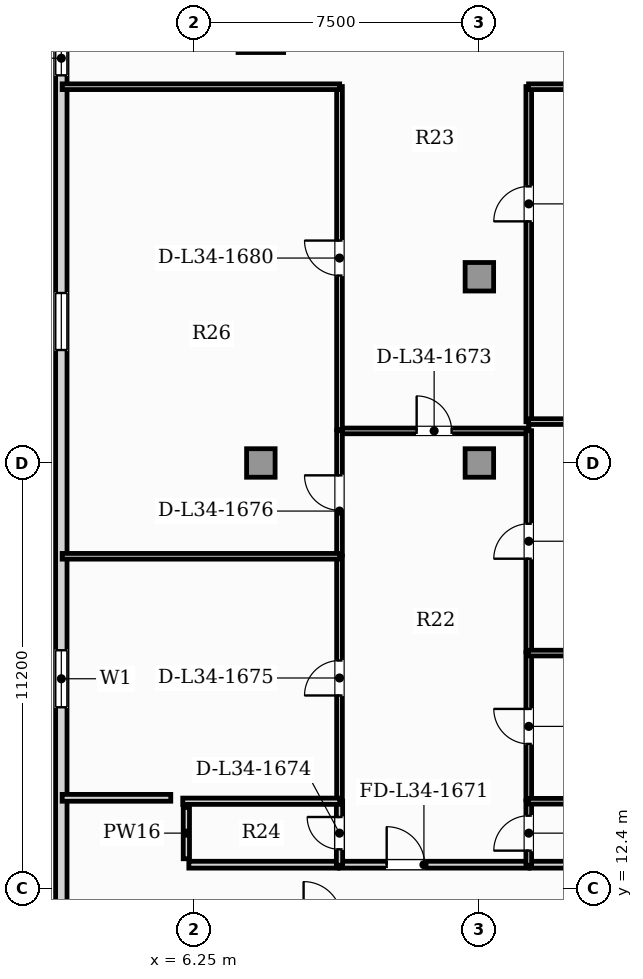
"""IFC4 building model, lengths in metres.
Left out: names, types, materials, properties, quantities, classifications, styles, units other than length and angle.
Written with IfcOpenShell. Run it as: python <this file> out.ifc"""

import sys

from ifc_helpers import new_model, si_unit, direction, frame, frame_2d, origin, origin_2d, place, context, subcontext, project, spatial, rectangle, hollow_rectangle, extrude, element, fill, save


model = new_model("IFC4")
c1 = context("Model", 3, precision=1e-05, world=origin(), true_north=direction((0.0, 1.0)))
c2 = subcontext(c1, "Body", "Model", "MODEL_VIEW")
j1 = project(units=[si_unit("LENGTHUNIT", "METRE"), si_unit("PLANEANGLEUNIT", "RADIAN")], contexts=[c1])
p1 = place(None, origin())
s1 = spatial("IfcSite", under=j1, at=p1, CompositionType="ELEMENT")
p2 = place(p1, origin())
s2 = spatial("IfcBuilding", under=s1, at=p2, CompositionType="ELEMENT")
p3 = place(p2, frame((0.0, 0.0, 140.15)))
s3 = spatial("IfcBuildingStorey", under=s2, at=p3, CompositionType="ELEMENT", Elevation=140.15)
p4 = place(p3, frame((8.0, 35.0, 0.0), z_axis=(0.0, 0.0, 1.0), x_axis=(1.0, 0.0, 0.0)))
e1 = element("IfcColumn", 1, at=p4, inside=s3, PredefinedType="USERDEFINED", context=c2, shape_type="SweptSolid", body=[
    extrude(hollow_rectangle(XDim=1.2, YDim=1.2, WallThickness=0.07, at=origin_2d()), origin(), (0.0, 0.0, 1.0), 5.05),
])
for number, where, z_axis, x_axis in (
    (2, (8.0, 23.6, 0.0), (0.0, 0.0, 1.0), (1.0, 0.0, 0.0)),
    (3, (13.75, 23.6, 0.0), (0.0, 0.0, 1.0), (1.0, 0.0, 0.0)),
    (4, (13.75, 28.5, 0.0), (0.0, 0.0, 1.0), (1.0, 0.0, 0.0)),
):
    element("IfcColumn", number, at=place(p3, frame(where, z_axis=z_axis, x_axis=x_axis)), inside=s3, PredefinedType="COLUMN", context=c2, shape_type="SweptSolid", body=[
        extrude(rectangle(XDim=0.75, YDim=0.75, at=origin_2d()), origin(), (0.0, 0.0, 1.0), 5.05),
    ])
p5 = place(p3, frame((2.75, 39.96, 0.0), z_axis=(0.0, 0.0, 1.0), x_axis=(0.0, -1.0, 0.0)))
e5 = element("IfcWall", 5, at=p5, inside=s3, PredefinedType="SOLIDWALL", context=c2, shape_type="SweptSolid", body=[
    extrude(rectangle(XDim=36.72, YDim=0.3, at=frame_2d((18.36, 0.0))), origin(), (0.0, 0.0, 1.0), 4.83),
])
p6 = place(p5, frame((5.26, 0.0, 0.95)))
e6 = element("IfcOpeningElement", 6, at=p6, cuts=e5, PredefinedType="OPENING", context=c2, shape_type="SweptSolid", body=[
    extrude(rectangle(XDim=0.9, YDim=1.5, at=frame_2d((0.45, 0.75))), frame((0.0, 0.16, 0.0), z_axis=(0.0, -1.0, 0.0), x_axis=(1.0, 0.0, 0.0)), (0.0, 0.0, 1.0), 0.32),
])
p7 = place(p5, frame((21.287, 0.0, 0.9)))
e7 = element("IfcOpeningElement", 7, at=p7, cuts=e5, PredefinedType="OPENING", context=c2, shape_type="SweptSolid", body=[
    extrude(rectangle(XDim=1.5, YDim=1.95, at=frame_2d((0.75, 0.975))), frame((0.0, 0.16, 0.0), z_axis=(0.0, -1.0, 0.0), x_axis=(1.0, 0.0, 0.0)), (0.0, 0.0, 1.0), 0.32),
])
p8 = place(p5, frame((11.887, 0.0, 0.9)))
e8 = element("IfcOpeningElement", 8, at=p8, cuts=e5, PredefinedType="OPENING", context=c2, shape_type="SweptSolid", body=[
    extrude(rectangle(XDim=1.5, YDim=1.95, at=frame_2d((0.75, 0.975))), frame((0.0, 0.16, 0.0), z_axis=(0.0, -1.0, 0.0), x_axis=(1.0, 0.0, 0.0)), (0.0, 0.0, 1.0), 0.32),
])
p9 = place(p3, frame((10.065, 13.03, 0.0), z_axis=(0.0, 0.0, 1.0), x_axis=(1.0, 0.0, 0.0)))
e9 = element("IfcWall", 9, at=p9, inside=s3, PredefinedType="PARTITIONING", context=c2, shape_type="SweptSolid", body=[
    extrude(rectangle(XDim=4.99, YDim=0.18, at=frame_2d((2.495, 0.0))), origin(), (0.0, 0.0, 1.0), 4.83),
])
p10 = place(p9, frame((1.247, 0.0, 0.0)))
e10 = element("IfcOpeningElement", 10, at=p10, cuts=e9, PredefinedType="OPENING", context=c2, shape_type="SweptSolid", body=[
    extrude(rectangle(XDim=1.0, YDim=2.15, at=frame_2d((0.5, 1.075))), frame((0.0, 0.1, 0.0), z_axis=(0.0, -1.0, 0.0), x_axis=(1.0, 0.0, 0.0)), (0.0, 0.0, 1.0), 0.2),
])
p11 = place(p3, frame((6.105, 13.03, 0.0), z_axis=(0.0, 0.0, 1.0), x_axis=(1.0, 0.0, 0.0)))
e11 = element("IfcWall", 11, at=p11, inside=s3, PredefinedType="PARTITIONING", context=c2, shape_type="SweptSolid", body=[
    extrude(rectangle(XDim=3.93, YDim=0.18, at=frame_2d((1.965, 0.0))), origin(), (0.0, 0.0, 1.0), 4.83),
])
p12 = place(p3, frame((15.085, 13.03, 0.0), z_axis=(0.0, 0.0, 1.0), x_axis=(1.0, 0.0, 0.0)))
e12 = element("IfcWall", 12, at=p12, inside=s3, PredefinedType="PARTITIONING", context=c2, shape_type="SweptSolid", body=[
    extrude(rectangle(XDim=6.42, YDim=0.18, at=frame_2d((3.21, 0.0))), origin(), (0.0, 0.0, 1.0), 4.83),
])
p13 = place(p3, frame((10.065, 24.444, 0.0), z_axis=(0.0, 0.0, 1.0), x_axis=(1.0, 0.0, 0.0)))
e13 = element("IfcWall", 13, at=p13, inside=s3, PredefinedType="PARTITIONING", context=c2, shape_type="SweptSolid", body=[
    extrude(rectangle(XDim=4.99, YDim=0.15, at=frame_2d((2.495, 0.0))), origin(), (0.0, 0.0, 1.0), 4.83),
])
p14 = place(p13, frame((2.035, 0.0, 0.0)))
e14 = element("IfcOpeningElement", 14, at=p14, cuts=e13, PredefinedType="OPENING", context=c2, shape_type="SweptSolid", body=[
    extrude(rectangle(XDim=0.92, YDim=2.1, at=frame_2d((0.46, 1.05))), frame((0.0, 0.085, 0.0), z_axis=(0.0, -1.0, 0.0), x_axis=(1.0, 0.0, 0.0)), (0.0, 0.0, 1.0), 0.17),
])
p15 = place(p3, frame((10.07, 13.015, 0.0), z_axis=(0.0, 0.0, 1.0), x_axis=(0.0, 1.0, 0.0)))
e15 = element("IfcWall", 15, at=p15, inside=s3, PredefinedType="PLUMBINGWALL", context=c2, shape_type="SweptSolid", body=[
    extrude(rectangle(XDim=1.69, YDim=0.165, at=frame_2d((0.845, 0.0))), origin(), (0.0, 0.0, 1.0), 4.377),
])
p16 = place(p15, frame((0.42, 0.0, 0.0)))
e16 = element("IfcOpeningElement", 16, at=p16, cuts=e15, PredefinedType="OPENING", context=c2, shape_type="SweptSolid", body=[
    extrude(rectangle(XDim=0.85, YDim=2.1, at=frame_2d((0.425, 1.05))), frame((0.0, 0.093, 0.0), z_axis=(0.0, -1.0, 0.0), x_axis=(1.0, 0.0, 0.0)), (0.0, 0.0, 1.0), 0.185),
])
p17 = place(p3, frame((10.07, 14.735, 0.0), z_axis=(0.0, 0.0, 1.0), x_axis=(0.0, 1.0, 0.0)))
e17 = element("IfcWall", 17, at=p17, inside=s3, PredefinedType="PARTITIONING", context=c2, shape_type="SweptSolid", body=[
    extrude(rectangle(XDim=6.415, YDim=0.15, at=frame_2d((3.208, 0.0))), origin(), (0.0, 0.0, 1.0), 4.377),
])
p18 = place(p17, frame((2.748, 0.0, 0.0)))
e18 = element("IfcOpeningElement", 18, at=p18, cuts=e17, PredefinedType="OPENING", context=c2, shape_type="SweptSolid", body=[
    extrude(rectangle(XDim=0.92, YDim=2.1, at=frame_2d((0.46, 1.05))), frame((0.0, 0.085, 0.0), z_axis=(0.0, -1.0, 0.0), x_axis=(1.0, 0.0, 0.0)), (0.0, 0.0, 1.0), 0.17),
])
p19 = place(p3, frame((10.07, 21.18, 0.0), z_axis=(0.0, 0.0, 1.0), x_axis=(0.0, 1.0, 0.0)))
e19 = element("IfcWall", 19, at=p19, inside=s3, PredefinedType="PARTITIONING", context=c2, shape_type="SweptSolid", body=[
    extrude(rectangle(XDim=3.269, YDim=0.15, at=frame_2d((1.634, 0.0))), origin(), (0.0, 0.0, 1.0), 4.377),
])
p20 = place(p19, frame((1.174, 0.0, 0.0)))
e20 = element("IfcOpeningElement", 20, at=p20, cuts=e19, PredefinedType="OPENING", context=c2, shape_type="SweptSolid", body=[
    extrude(rectangle(XDim=0.92, YDim=2.1, at=frame_2d((0.46, 1.05))), frame((0.0, 0.085, 0.0), z_axis=(0.0, -1.0, 0.0), x_axis=(1.0, 0.0, 0.0)), (0.0, 0.0, 1.0), 0.17),
])
p21 = place(p3, frame((15.05, 13.015, 0.0), z_axis=(0.0, 0.0, 1.0), x_axis=(0.0, 1.0, 0.0)))
e21 = element("IfcWall", 21, at=p21, inside=s3, PredefinedType="PARTITIONING", context=c2, shape_type="SweptSolid", body=[
    extrude(rectangle(XDim=1.69, YDim=0.15, at=frame_2d((0.845, 0.0))), origin(), (0.0, 0.0, 1.0), 4.83),
])
p22 = place(p21, frame((0.385, 0.0, 0.0)))
e22 = element("IfcOpeningElement", 22, at=p22, cuts=e21, PredefinedType="OPENING", context=c2, shape_type="SweptSolid", body=[
    extrude(rectangle(XDim=0.92, YDim=2.1, at=frame_2d((0.46, 1.05))), frame((0.0, 0.085, 0.0), z_axis=(0.0, -1.0, 0.0), x_axis=(1.0, 0.0, 0.0)), (0.0, 0.0, 1.0), 0.17),
])
p23 = place(p3, frame((15.05, 14.735, 0.0), z_axis=(0.0, 0.0, 1.0), x_axis=(0.0, 1.0, 0.0)))
e23 = element("IfcWall", 23, at=p23, inside=s3, PredefinedType="PARTITIONING", context=c2, shape_type="SweptSolid", body=[
    extrude(rectangle(XDim=3.868, YDim=0.15, at=frame_2d((1.934, 0.0))), origin(), (0.0, 0.0, 1.0), 4.83),
])
p24 = place(p23, frame((1.474, 0.0, 0.0)))
e24 = element("IfcOpeningElement", 24, at=p24, cuts=e23, PredefinedType="OPENING", context=c2, shape_type="SweptSolid", body=[
    extrude(rectangle(XDim=0.92, YDim=2.1, at=frame_2d((0.46, 1.05))), frame((0.0, 0.085, 0.0), z_axis=(0.0, -1.0, 0.0), x_axis=(1.0, 0.0, 0.0)), (0.0, 0.0, 1.0), 0.17),
])
p25 = place(p3, frame((15.05, 18.633, 0.0), z_axis=(0.0, 0.0, 1.0), x_axis=(0.0, 1.0, 0.0)))
e25 = element("IfcWall", 25, at=p25, inside=s3, PredefinedType="PARTITIONING", context=c2, shape_type="SweptSolid", body=[
    extrude(rectangle(XDim=5.816, YDim=0.15, at=frame_2d((2.908, 0.0))), origin(), (0.0, 0.0, 1.0), 4.83),
])
p26 = place(p25, frame((2.448, 0.0, 0.0)))
e26 = element("IfcOpeningElement", 26, at=p26, cuts=e25, PredefinedType="OPENING", context=c2, shape_type="SweptSolid", body=[
    extrude(rectangle(XDim=0.92, YDim=2.1, at=frame_2d((0.46, 1.05))), frame((0.0, 0.085, 0.0), z_axis=(0.0, -1.0, 0.0), x_axis=(1.0, 0.0, 0.0)), (0.0, 0.0, 1.0), 0.17),
])
p27 = place(p3, frame((10.07, 24.479, 0.0), z_axis=(0.0, 0.0, 1.0), x_axis=(0.0, 1.0, 0.0)))
e27 = element("IfcWall", 27, at=p27, inside=s3, PredefinedType="PARTITIONING", context=c2, shape_type="SweptSolid", body=[
    extrude(rectangle(XDim=9.026, YDim=0.15, at=frame_2d((4.513, 0.0))), origin(), (0.0, 0.0, 1.0), 4.377),
])
p28 = place(p27, frame((4.053, 0.0, 0.0)))
e28 = element("IfcOpeningElement", 28, at=p28, cuts=e27, PredefinedType="OPENING", context=c2, shape_type="SweptSolid", body=[
    extrude(rectangle(XDim=0.92, YDim=2.1, at=frame_2d((0.46, 1.05))), frame((0.0, 0.085, 0.0), z_axis=(0.0, -1.0, 0.0), x_axis=(1.0, 0.0, 0.0)), (0.0, 0.0, 1.0), 0.17),
])
p29 = place(p3, frame((2.772, 33.5, 0.0), z_axis=(0.0, 0.0, 1.0), x_axis=(1.0, 0.0, 0.0)))
e29 = element("IfcWall", 29, at=p29, inside=s3, PredefinedType="PARTITIONING", context=c2, shape_type="SweptSolid", body=[
    extrude(rectangle(XDim=7.302, YDim=0.15, at=frame_2d((3.651, 0.0))), origin(), (0.0, 0.0, 1.0), 4.83),
])
p30 = place(p3, frame((15.05, 24.684, 0.0), z_axis=(0.0, 0.0, 1.0), x_axis=(0.0, 1.0, 0.0)))
e30 = element("IfcWall", 30, at=p30, inside=s3, PredefinedType="PARTITIONING", context=c2, shape_type="SweptSolid", body=[
    extrude(rectangle(XDim=8.821, YDim=0.15, at=frame_2d((4.411, 0.0))), origin(), (0.0, 0.0, 1.0), 4.83),
])
p31 = place(p30, frame((5.274, 0.0, 0.0)))
e31 = element("IfcOpeningElement", 31, at=p31, cuts=e30, PredefinedType="OPENING", context=c2, shape_type="SweptSolid", body=[
    extrude(rectangle(XDim=0.92, YDim=2.1, at=frame_2d((0.46, 1.05))), frame((0.0, 0.085, 0.0), z_axis=(0.0, -1.0, 0.0), x_axis=(1.0, 0.0, 0.0)), (0.0, 0.0, 1.0), 0.17),
])
p32 = place(p3, frame((15.045, 33.5, 0.0), z_axis=(0.0, 0.0, 1.0), x_axis=(1.0, 0.0, 0.0)))
e32 = element("IfcWall", 32, at=p32, inside=s3, PredefinedType="PARTITIONING", context=c2, shape_type="SweptSolid", body=[
    extrude(rectangle(XDim=6.5, YDim=0.15, at=frame_2d((3.25, 0.0))), origin(), (0.0, 0.0, 1.0), 4.83),
])
p33 = place(p3, frame((5.945, 14.7, 0.0), z_axis=(0.0, 0.0, 1.0), x_axis=(1.0, 0.0, 0.0)))
e33 = element("IfcWall", 33, at=p33, inside=s3, PredefinedType="PLUMBINGWALL", context=c2, shape_type="SweptSolid", body=[
    extrude(rectangle(XDim=4.13, YDim=0.165, at=frame_2d((2.065, 0.0))), origin(), (0.0, 0.0, 1.0), 4.83),
])
p34 = place(p3, frame((2.772, 21.145, 0.0), z_axis=(0.0, 0.0, 1.0), x_axis=(1.0, 0.0, 0.0)))
e34 = element("IfcWall", 34, at=p34, inside=s3, PredefinedType="PARTITIONING", context=c2, shape_type="SweptSolid", body=[
    extrude(rectangle(XDim=7.302, YDim=0.15, at=frame_2d((3.651, 0.0))), origin(), (0.0, 0.0, 1.0), 4.83),
])
for number, where, z_axis, x_axis in (
    (35, (15.045, 14.7, 0.0), (0.0, 0.0, 1.0), (1.0, 0.0, 0.0)),
    (36, (15.045, 18.598, 0.0), (0.0, 0.0, 1.0), (1.0, 0.0, 0.0)),
    (37, (15.045, 24.689, 0.0), (0.0, 0.0, 1.0), (1.0, 0.0, 0.0)),
):
    element("IfcWall", number, at=place(p3, frame(where, z_axis=z_axis, x_axis=x_axis)), inside=s3, PredefinedType="PARTITIONING", context=c2, shape_type="SweptSolid", body=[
        extrude(rectangle(XDim=6.5, YDim=0.15, at=frame_2d((3.25, 0.0))), origin(), (0.0, 0.0, 1.0), 4.83),
    ])
p35 = place(p3, frame((6.04, 13.186, 0.0), z_axis=(0.0, 0.0, 1.0), x_axis=(0.0, 1.0, 0.0)))
e38 = element("IfcWall", 38, at=p35, inside=s3, PredefinedType="PLUMBINGWALL", context=c2, shape_type="SweptSolid", body=[
    extrude(rectangle(XDim=1.349, YDim=0.165, at=frame_2d((0.674, 0.0))), origin(), (0.0, 0.0, 1.0), 4.83),
])
p36 = place(p3, frame((5.63, 14.79, 0.0), z_axis=(0.0, 0.0, 1.0), x_axis=(-1.0, 0.0, 0.0)))
e39 = element("IfcWall", 39, at=p36, inside=s3, PredefinedType="PARTITIONING", context=c2, shape_type="SweptSolid", body=[
    extrude(rectangle(XDim=2.858, YDim=0.18, at=frame_2d((1.429, 0.0))), origin(), (0.0, 0.0, 1.0), 4.83),
])
p37 = place(p6, origin())
e40 = element("IfcWindow", 40, at=p37, inside=s3, PartitioningType="SINGLE_PANEL", PredefinedType="WINDOW", context=c2, shape_type="SweptSolid", body=[
    extrude(rectangle(XDim=0.9, YDim=1.5, at=frame_2d((0.45, 0.75))), frame((0.0, 0.03, 0.0), z_axis=(0.0, -1.0, 0.0), x_axis=(1.0, 0.0, 0.0)), (0.0, 0.0, 1.0), 0.06),
])
fill(e6, e40)
p38 = place(p7, origin())
e41 = element("IfcWindow", 41, at=p38, inside=s3, PartitioningType="SINGLE_PANEL", PredefinedType="WINDOW", context=c2, shape_type="SweptSolid", body=[
    extrude(rectangle(XDim=1.5, YDim=1.95, at=frame_2d((0.75, 0.975))), frame((0.0, 0.03, 0.0), z_axis=(0.0, -1.0, 0.0), x_axis=(1.0, 0.0, 0.0)), (0.0, 0.0, 1.0), 0.06),
])
fill(e7, e41)
p39 = place(p8, origin())
e42 = element("IfcWindow", 42, at=p39, inside=s3, PartitioningType="SINGLE_PANEL", PredefinedType="WINDOW", context=c2, shape_type="SweptSolid", body=[
    extrude(rectangle(XDim=1.5, YDim=1.95, at=frame_2d((0.75, 0.975))), frame((0.0, 0.03, 0.0), z_axis=(0.0, -1.0, 0.0), x_axis=(1.0, 0.0, 0.0)), (0.0, 0.0, 1.0), 0.06),
])
fill(e8, e42)
p40 = place(p10, origin())
e43 = element("IfcDoor", 43, at=p40, inside=s3, OperationType="SINGLE_SWING_LEFT", PredefinedType="DOOR", context=c2, shape_type="SweptSolid", body=[
    extrude(rectangle(XDim=1.0, YDim=2.15, at=frame_2d((0.5, 1.075))), frame((0.0, 0.025, 0.0), z_axis=(0.0, -1.0, 0.0), x_axis=(1.0, 0.0, 0.0)), (0.0, 0.0, 1.0), 0.05),
])
fill(e10, e43)
p41 = place(p14, origin())
e44 = element("IfcDoor", 44, at=p41, inside=s3, OperationType="SINGLE_SWING_LEFT", PredefinedType="DOOR", context=c2, shape_type="SweptSolid", body=[
    extrude(rectangle(XDim=0.92, YDim=2.1, at=frame_2d((0.46, 1.05))), frame((0.0, 0.025, 0.0), z_axis=(0.0, -1.0, 0.0), x_axis=(1.0, 0.0, 0.0)), (0.0, 0.0, 1.0), 0.05),
])
fill(e14, e44)
p42 = place(p16, origin())
e45 = element("IfcDoor", 45, at=p42, inside=s3, OperationType="SINGLE_SWING_RIGHT", PredefinedType="DOOR", context=c2, shape_type="SweptSolid", body=[
    extrude(rectangle(XDim=0.85, YDim=2.1, at=frame_2d((0.425, 1.05))), frame((0.0, 0.025, 0.0), z_axis=(0.0, -1.0, 0.0), x_axis=(1.0, 0.0, 0.0)), (0.0, 0.0, 1.0), 0.05),
])
fill(e16, e45)
p43 = place(p18, origin())
e46 = element("IfcDoor", 46, at=p43, inside=s3, OperationType="SINGLE_SWING_LEFT", PredefinedType="DOOR", context=c2, shape_type="SweptSolid", body=[
    extrude(rectangle(XDim=0.92, YDim=2.1, at=frame_2d((0.46, 1.05))), frame((0.0, 0.025, 0.0), z_axis=(0.0, -1.0, 0.0), x_axis=(1.0, 0.0, 0.0)), (0.0, 0.0, 1.0), 0.05),
])
fill(e18, e46)
p44 = place(p20, origin())
e47 = element("IfcDoor", 47, at=p44, inside=s3, OperationType="SINGLE_SWING_RIGHT", PredefinedType="DOOR", context=c2, shape_type="SweptSolid", body=[
    extrude(rectangle(XDim=0.92, YDim=2.1, at=frame_2d((0.46, 1.05))), frame((0.0, 0.025, 0.0), z_axis=(0.0, -1.0, 0.0), x_axis=(1.0, 0.0, 0.0)), (0.0, 0.0, 1.0), 0.05),
])
fill(e20, e47)
p45 = place(p22, origin())
e48 = element("IfcDoor", 48, at=p45, inside=s3, OperationType="SINGLE_SWING_LEFT", PredefinedType="DOOR", context=c2, shape_type="SweptSolid", body=[
    extrude(rectangle(XDim=0.92, YDim=2.1, at=frame_2d((0.46, 1.05))), frame((0.0, 0.025, 0.0), z_axis=(0.0, -1.0, 0.0), x_axis=(1.0, 0.0, 0.0)), (0.0, 0.0, 1.0), 0.05),
])
fill(e22, e48)
p46 = place(p24, origin())
e49 = element("IfcDoor", 49, at=p46, inside=s3, OperationType="SINGLE_SWING_RIGHT", PredefinedType="DOOR", context=c2, shape_type="SweptSolid", body=[
    extrude(rectangle(XDim=0.92, YDim=2.1, at=frame_2d((0.46, 1.05))), frame((0.0, 0.025, 0.0), z_axis=(0.0, -1.0, 0.0), x_axis=(1.0, 0.0, 0.0)), (0.0, 0.0, 1.0), 0.05),
])
fill(e24, e49)
p47 = place(p26, origin())
e50 = element("IfcDoor", 50, at=p47, inside=s3, OperationType="SINGLE_SWING_LEFT", PredefinedType="DOOR", context=c2, shape_type="SweptSolid", body=[
    extrude(rectangle(XDim=0.92, YDim=2.1, at=frame_2d((0.46, 1.05))), frame((0.0, 0.025, 0.0), z_axis=(0.0, -1.0, 0.0), x_axis=(1.0, 0.0, 0.0)), (0.0, 0.0, 1.0), 0.05),
])
fill(e26, e50)
p48 = place(p28, origin())
e51 = element("IfcDoor", 51, at=p48, inside=s3, OperationType="SINGLE_SWING_RIGHT", PredefinedType="DOOR", context=c2, shape_type="SweptSolid", body=[
    extrude(rectangle(XDim=0.92, YDim=2.1, at=frame_2d((0.46, 1.05))), frame((0.0, 0.025, 0.0), z_axis=(0.0, -1.0, 0.0), x_axis=(1.0, 0.0, 0.0)), (0.0, 0.0, 1.0), 0.05),
])
fill(e28, e51)
p49 = place(p31, origin())
e52 = element("IfcDoor", 52, at=p49, inside=s3, OperationType="SINGLE_SWING_LEFT", PredefinedType="DOOR", context=c2, shape_type="SweptSolid", body=[
    extrude(rectangle(XDim=0.92, YDim=2.1, at=frame_2d((0.46, 1.05))), frame((0.0, 0.025, 0.0), z_axis=(0.0, -1.0, 0.0), x_axis=(1.0, 0.0, 0.0)), (0.0, 0.0, 1.0), 0.05),
])
fill(e31, e52)
save(model, sys.argv[1])
